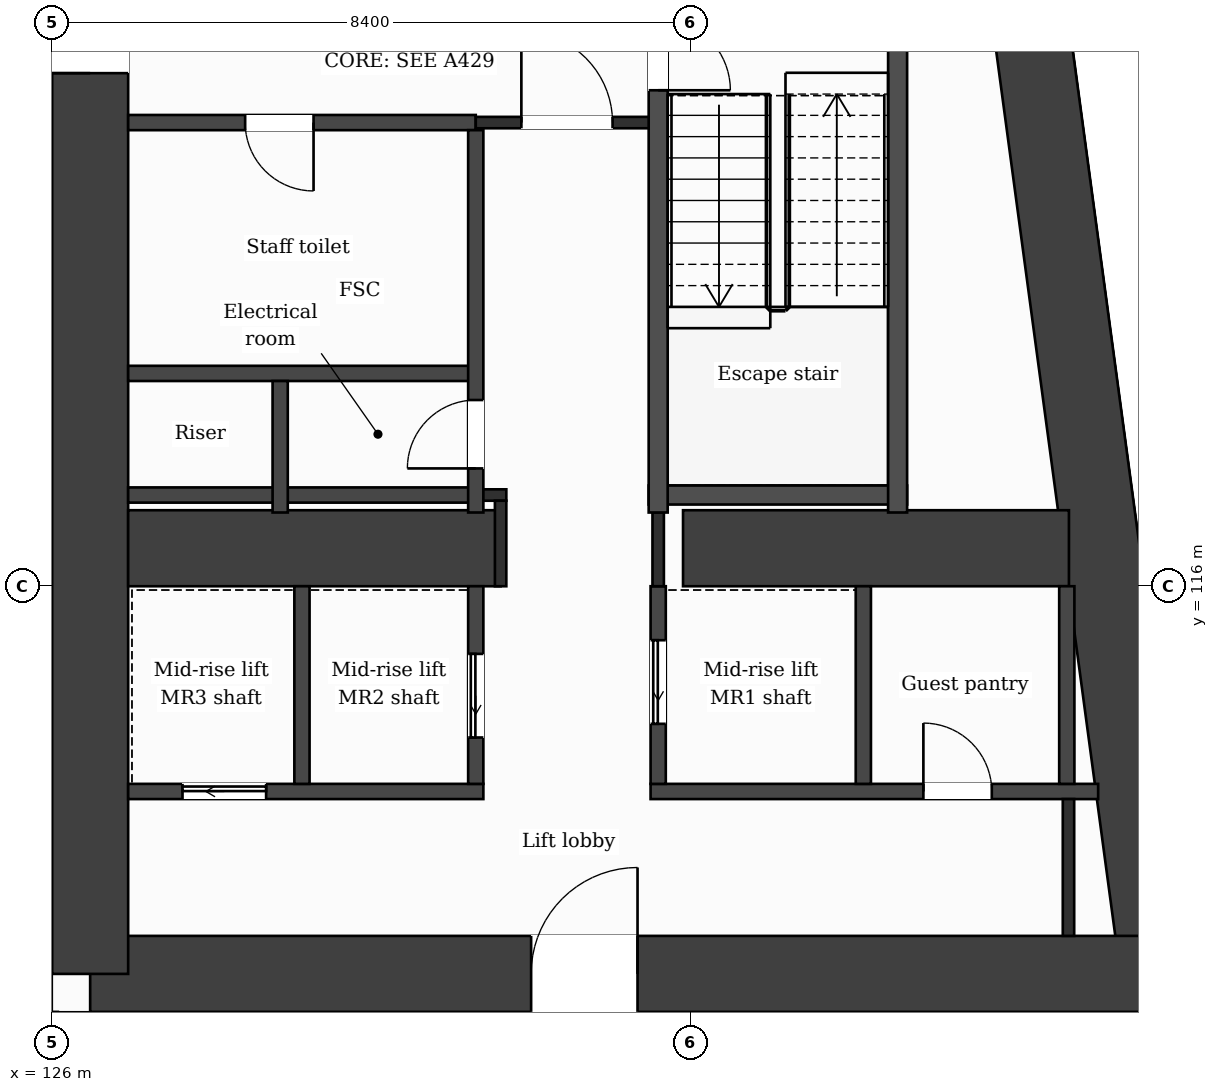
"""IFC4 building model, lengths in metres.
Left out: names, types, materials, properties, quantities, classifications, styles, units other than length and angle.
Written with IfcOpenShell. Run it as: python <this file> out.ifc"""

import sys

from ifc_helpers import new_model, si_unit, direction, frame, frame_2d, origin, place, context, subcontext, project, spatial, rectangle, extrude, element, fill, save


model = new_model("IFC4")
c1 = context("Model", 3, precision=1e-05, world=origin(), true_north=direction((0.0, 1.0)))
c2 = subcontext(c1, "Body", "Model", "MODEL_VIEW")
j1 = project(units=[si_unit("LENGTHUNIT", "METRE"), si_unit("PLANEANGLEUNIT", "RADIAN")], contexts=[c1])
p1 = place(None, origin())
s1 = spatial("IfcSite", under=j1, at=p1, CompositionType="ELEMENT")
p2 = place(p1, origin())
s2 = spatial("IfcBuilding", under=s1, at=p2, CompositionType="ELEMENT")
p3 = place(p2, frame((0.0, 0.0, 120.6)))
s3 = spatial("IfcBuildingStorey", under=s2, at=p3, CompositionType="ELEMENT", Elevation=120.6)
p4 = place(p3, frame((137.732, 131.9, 0.0), z_axis=(0.0, 0.0, 1.0), x_axis=(0.133411141623, -0.991060778808, 0.0)))
e1 = element("IfcWall", 1, at=p4, inside=s3, PredefinedType="SHEAR", context=c2, shape_type="SweptSolid", body=[
    extrude(rectangle(XDim=21.189, YDim=1.0, at=frame_2d((10.595, 0.0))), origin(), (0.0, 0.0, 1.0), 3.7),
])
p5 = place(p3, frame((140.559, 110.9, 0.0), z_axis=(0.0, 0.0, 1.0), x_axis=(-1.0, 0.0, 0.0)))
e2 = element("IfcWall", 2, at=p5, inside=s3, PredefinedType="SHEAR", context=c2, shape_type="SweptSolid", body=[
    extrude(rectangle(XDim=14.059, YDim=1.0, at=frame_2d((7.029, 0.0))), origin(), (0.0, 0.0, 1.0), 3.7),
])
p6 = place(p5, frame((6.858, 0.0, 0.0)))
e3 = element("IfcOpeningElement", 3, at=p6, cuts=e2, PredefinedType="OPENING", context=c2, shape_type="SweptSolid", body=[
    extrude(rectangle(XDim=1.4, YDim=2.1, at=frame_2d((0.7, 1.05))), frame((0.0, 0.51, 0.0), z_axis=(0.0, -1.0, 0.0), x_axis=(1.0, 0.0, 0.0)), (0.0, 0.0, 1.0), 1.02),
])
p7 = place(p3, frame((126.5, 110.9, 0.0), z_axis=(0.0, 0.0, 1.0), x_axis=(0.0, 1.0, 0.0)))
e4 = element("IfcWall", 4, at=p7, inside=s3, PredefinedType="SHEAR", context=c2, shape_type="SweptSolid", body=[
    extrude(rectangle(XDim=21.0, YDim=1.0, at=frame_2d((10.5, 0.0))), origin(), (0.0, 0.0, 1.0), 3.7),
])
p8 = place(p7, frame((11.85, 0.0, 0.0)))
e5 = element("IfcOpeningElement", 5, at=p8, cuts=e4, PredefinedType="OPENING", context=c2, shape_type="SweptSolid", body=[
    extrude(rectangle(XDim=1.4, YDim=2.1, at=frame_2d((0.7, 1.05))), frame((0.0, 0.51, 0.0), z_axis=(0.0, -1.0, 0.0), x_axis=(1.0, 0.0, 0.0)), (0.0, 0.0, 1.0), 1.02),
])
p9 = place(p3, frame((127.0, 116.5, 0.0), z_axis=(0.0, 0.0, 1.0), x_axis=(1.0, 0.0, 0.0)))
e6 = element("IfcWall", 6, at=p9, inside=s3, PredefinedType="SHEAR", context=c2, shape_type="SweptSolid", body=[
    extrude(rectangle(XDim=4.9, YDim=1.0, at=frame_2d((2.45, 0.0))), origin(), (0.0, 0.0, 1.0), 3.7),
])
p10 = place(p3, frame((134.3, 116.5, 0.0), z_axis=(0.0, 0.0, 1.0), x_axis=(1.0, 0.0, 0.0)))
e7 = element("IfcWall", 7, at=p10, inside=s3, PredefinedType="SHEAR", context=c2, shape_type="SweptSolid", body=[
    extrude(rectangle(XDim=5.077, YDim=1.0, at=frame_2d((2.539, 0.0))), origin(), (0.0, 0.0, 1.0), 3.7),
])
p11 = place(p3, frame((140.348, 103.85, 0.0), z_axis=(0.0, 0.0, 1.0), x_axis=(-0.133431549479, 0.991058031401, 0.0)))
e8 = element("IfcWall", 8, at=p11, inside=s3, PredefinedType="SOLIDWALL", context=c2, shape_type="SweptSolid", body=[
    extrude(rectangle(XDim=6.609, YDim=0.3, at=frame_2d((3.304, 0.0))), origin(), (0.0, 0.0, 1.0), 3.38),
])
p12 = place(p11, frame((0.737, 0.0, 0.9)))
e9 = element("IfcOpeningElement", 9, at=p12, cuts=e8, PredefinedType="OPENING", context=c2, shape_type="SweptSolid", body=[
    extrude(rectangle(XDim=1.2, YDim=2.1, at=frame_2d((0.6, 1.05))), frame((0.0, 0.16, 0.0), z_axis=(0.0, -1.0, 0.0), x_axis=(1.0, 0.0, 0.0)), (0.0, 0.0, 1.0), 0.32),
])
p13 = place(p11, frame((3.991, 0.0, 0.0)))
e10 = element("IfcOpeningElement", 10, at=p13, cuts=e8, PredefinedType="OPENING", context=c2, shape_type="SweptSolid", body=[
    extrude(rectangle(XDim=1.2, YDim=2.4, at=frame_2d((0.6, 1.2))), frame((0.0, 0.16, 0.0), z_axis=(0.0, -1.0, 0.0), x_axis=(1.0, 0.0, 0.0)), (0.0, 0.0, 1.0), 0.32),
])
p14 = place(p3, frame((127.0, 113.3, 0.0), z_axis=(0.0, 0.0, 1.0), x_axis=(1.0, 0.0, 0.0)))
e11 = element("IfcWall", 11, at=p14, inside=s3, PredefinedType="PARTITIONING", context=c2, shape_type="SweptSolid", body=[
    extrude(rectangle(XDim=4.673, YDim=0.2, at=frame_2d((2.336, 0.0))), origin(), (0.0, 0.0, 1.0), 3.38),
])
p15 = place(p14, frame((0.715, 0.0, 0.0)))
e12 = element("IfcOpeningElement", 12, at=p15, cuts=e11, PredefinedType="OPENING", context=c2, shape_type="SweptSolid", body=[
    extrude(rectangle(XDim=1.1, YDim=2.1, at=frame_2d((0.55, 1.05))), frame((0.0, 0.11, 0.0), z_axis=(0.0, -1.0, 0.0), x_axis=(1.0, 0.0, 0.0)), (0.0, 0.0, 1.0), 0.22),
])
p16 = place(p3, frame((133.873, 113.3, 0.0), z_axis=(0.0, 0.0, 1.0), x_axis=(1.0, 0.0, 0.0)))
e13 = element("IfcWall", 13, at=p16, inside=s3, PredefinedType="PARTITIONING", context=c2, shape_type="SweptSolid", body=[
    extrude(rectangle(XDim=5.888, YDim=0.2, at=frame_2d((2.944, 0.0))), origin(), (0.0, 0.0, 1.0), 3.38),
])
p17 = place(p16, frame((3.589, 0.0, 0.0)))
e14 = element("IfcOpeningElement", 14, at=p17, cuts=e13, PredefinedType="OPENING", context=c2, shape_type="SweptSolid", body=[
    extrude(rectangle(XDim=0.9, YDim=2.1, at=frame_2d((0.45, 1.05))), frame((0.0, 0.11, 0.0), z_axis=(0.0, -1.0, 0.0), x_axis=(1.0, 0.0, 0.0)), (0.0, 0.0, 1.0), 0.22),
])
p18 = place(p3, frame((127.0, 117.2, 0.0), z_axis=(0.0, 0.0, 1.0), x_axis=(1.0, 0.0, 0.0)))
e15 = element("IfcWall", 15, at=p18, inside=s3, PredefinedType="PARTITIONING", context=c2, shape_type="SweptSolid", body=[
    extrude(rectangle(XDim=4.573, YDim=0.2, at=frame_2d((2.287, 0.0))), origin(), (0.0, 0.0, 1.0), 3.38),
])
p19 = place(p3, frame((131.573, 117.2, 0.0), z_axis=(0.0, 0.0, 1.0), x_axis=(1.0, 0.0, 0.0)))
e16 = element("IfcWall", 16, at=p19, inside=s3, PredefinedType="PARTITIONING", context=c2, shape_type="SweptSolid", body=[
    extrude(rectangle(XDim=0.402, YDim=0.15, at=frame_2d((0.201, 0.0))), origin(), (0.0, 0.0, 1.0), 3.38),
])
p20 = place(p3, frame((133.848, 117.2, 0.0), z_axis=(0.0, 0.0, 1.0), x_axis=(1.0, 0.0, 0.0)))
e17 = element("IfcWall", 17, at=p20, inside=s3, PredefinedType="PARTITIONING", context=c2, shape_type="SweptSolid", body=[
    extrude(rectangle(XDim=3.4, YDim=0.25, at=frame_2d((1.7, 0.0))), origin(), (0.0, 0.0, 1.0), 3.38),
])
p21 = place(p3, frame((127.0, 118.8, 0.0), z_axis=(0.0, 0.0, 1.0), x_axis=(1.0, 0.0, 0.0)))
e18 = element("IfcWall", 18, at=p21, inside=s3, PredefinedType="PARTITIONING", context=c2, shape_type="SweptSolid", body=[
    extrude(rectangle(XDim=4.573, YDim=0.2, at=frame_2d((2.287, 0.0))), origin(), (0.0, 0.0, 1.0), 3.38),
])
p22 = place(p3, frame((127.0, 122.1, 0.0), z_axis=(0.0, 0.0, 1.0), x_axis=(1.0, 0.0, 0.0)))
e19 = element("IfcWall", 19, at=p22, inside=s3, PredefinedType="PARTITIONING", context=c2, shape_type="SweptSolid", body=[
    extrude(rectangle(XDim=4.573, YDim=0.2, at=frame_2d((2.287, 0.0))), origin(), (0.0, 0.0, 1.0), 3.38),
])
p23 = place(p22, frame((1.539, 0.0, 0.0)))
e20 = element("IfcOpeningElement", 20, at=p23, cuts=e19, PredefinedType="OPENING", context=c2, shape_type="SweptSolid", body=[
    extrude(rectangle(XDim=0.9, YDim=2.1, at=frame_2d((0.45, 1.05))), frame((0.0, 0.11, 0.0), z_axis=(0.0, -1.0, 0.0), x_axis=(1.0, 0.0, 0.0)), (0.0, 0.0, 1.0), 0.22),
])
p24 = place(p3, frame((131.573, 122.1, 0.0), z_axis=(0.0, 0.0, 1.0), x_axis=(1.0, 0.0, 0.0)))
e21 = element("IfcWall", 21, at=p24, inside=s3, PredefinedType="PARTITIONING", context=c2, shape_type="SweptSolid", body=[
    extrude(rectangle(XDim=2.4, YDim=0.15, at=frame_2d((1.2, 0.0))), origin(), (0.0, 0.0, 1.0), 3.38),
])
p25 = place(p24, frame((0.6, 0.0, 0.0)))
e22 = element("IfcOpeningElement", 22, at=p25, cuts=e21, PredefinedType="OPENING", context=c2, shape_type="SweptSolid", body=[
    extrude(rectangle(XDim=1.2, YDim=2.1, at=frame_2d((0.6, 1.05))), frame((0.0, 0.085, 0.0), z_axis=(0.0, -1.0, 0.0), x_axis=(1.0, 0.0, 0.0)), (0.0, 0.0, 1.0), 0.17),
])
p26 = place(p3, frame((100.8, 122.45, 0.0), z_axis=(0.0, 0.0, 1.0), x_axis=(1.0, 0.0, 0.0)))
e23 = element("IfcWall", 23, at=p26, inside=s3, PredefinedType="PARTITIONING", context=c2, shape_type="SweptSolid", body=[
    extrude(rectangle(XDim=25.2, YDim=0.15, at=frame_2d((12.6, 0.0))), origin(), (0.0, 0.0, 1.0), 3.38),
])
p27 = place(p3, frame((126.0, 109.075, 0.0), z_axis=(0.0, 0.0, 1.0), x_axis=(0.0, 1.0, 0.0)))
e24 = element("IfcWall", 24, at=p27, inside=s3, PredefinedType="PARTITIONING", context=c2, shape_type="SweptSolid", body=[
    extrude(rectangle(XDim=1.325, YDim=0.15, at=frame_2d((0.663, 0.0))), origin(), (0.0, 0.0, 1.0), 3.38),
])
p28 = place(p3, frame((129.0, 116.97, 0.0), z_axis=(0.0, 0.0, 1.0), x_axis=(0.0, 1.0, 0.0)))
e25 = element("IfcWall", 25, at=p28, inside=s3, PredefinedType="PARTITIONING", context=c2, shape_type="SweptSolid", body=[
    extrude(rectangle(XDim=1.73, YDim=0.2, at=frame_2d((0.865, 0.0))), origin(), (0.0, 0.0, 1.0), 3.38),
])
p29 = place(p3, frame((129.287, 113.4, 0.0), z_axis=(0.0, 0.0, 1.0), x_axis=(0.0, 1.0, 0.0)))
e26 = element("IfcWall", 26, at=p29, inside=s3, PredefinedType="PARTITIONING", context=c2, shape_type="SweptSolid", body=[
    extrude(rectangle(XDim=2.6, YDim=0.2, at=frame_2d((1.3, 0.0))), origin(), (0.0, 0.0, 1.0), 3.38),
])
p30 = place(p3, frame((131.573, 113.4, 0.0), z_axis=(0.0, 0.0, 1.0), x_axis=(0.0, 1.0, 0.0)))
e27 = element("IfcWall", 27, at=p30, inside=s3, PredefinedType="PARTITIONING", context=c2, shape_type="SweptSolid", body=[
    extrude(rectangle(XDim=2.6, YDim=0.2, at=frame_2d((1.3, 0.0))), origin(), (0.0, 0.0, 1.0), 3.38),
])
p31 = place(p30, frame((0.61, 0.0, 0.0)))
e28 = element("IfcOpeningElement", 28, at=p31, cuts=e27, PredefinedType="OPENING", context=c2, shape_type="SweptSolid", body=[
    extrude(rectangle(XDim=1.1, YDim=2.1, at=frame_2d((0.55, 1.05))), frame((0.0, 0.11, 0.0), z_axis=(0.0, -1.0, 0.0), x_axis=(1.0, 0.0, 0.0)), (0.0, 0.0, 1.0), 0.22),
])
p32 = place(p3, frame((131.573, 116.97, 0.0), z_axis=(0.0, 0.0, 1.0), x_axis=(0.0, 1.0, 0.0)))
e29 = element("IfcWall", 29, at=p32, inside=s3, PredefinedType="PARTITIONING", context=c2, shape_type="SweptSolid", body=[
    extrude(rectangle(XDim=5.03, YDim=0.2, at=frame_2d((2.515, 0.0))), origin(), (0.0, 0.0, 1.0), 3.38),
])
p33 = place(p32, frame((0.58, 0.0, 0.0)))
e30 = element("IfcOpeningElement", 30, at=p33, cuts=e29, PredefinedType="OPENING", context=c2, shape_type="SweptSolid", body=[
    extrude(rectangle(XDim=0.9, YDim=2.1, at=frame_2d((0.45, 1.05))), frame((0.0, 0.11, 0.0), z_axis=(0.0, -1.0, 0.0), x_axis=(1.0, 0.0, 0.0)), (0.0, 0.0, 1.0), 0.22),
])
p34 = place(p3, frame((131.9, 116.0, 0.0), z_axis=(0.0, 0.0, 1.0), x_axis=(0.0, 1.0, 0.0)))
e31 = element("IfcWall", 31, at=p34, inside=s3, PredefinedType="PARTITIONING", context=c2, shape_type="SweptSolid", body=[
    extrude(rectangle(XDim=1.125, YDim=0.15, at=frame_2d((0.562, 0.0))), origin(), (0.0, 0.0, 1.0), 3.38),
])
p35 = place(p3, frame((133.973, 113.4, 0.0), z_axis=(0.0, 0.0, 1.0), x_axis=(0.0, 1.0, 0.0)))
e32 = element("IfcWall", 32, at=p35, inside=s3, PredefinedType="PARTITIONING", context=c2, shape_type="SweptSolid", body=[
    extrude(rectangle(XDim=2.6, YDim=0.2, at=frame_2d((1.3, 0.0))), origin(), (0.0, 0.0, 1.0), 3.38),
])
p36 = place(p35, frame((0.79, 0.0, 0.0)))
e33 = element("IfcOpeningElement", 33, at=p36, cuts=e32, PredefinedType="OPENING", context=c2, shape_type="SweptSolid", body=[
    extrude(rectangle(XDim=1.1, YDim=2.1, at=frame_2d((0.55, 1.05))), frame((0.0, 0.11, 0.0), z_axis=(0.0, -1.0, 0.0), x_axis=(1.0, 0.0, 0.0)), (0.0, 0.0, 1.0), 0.22),
])
p37 = place(p3, frame((133.973, 116.0, 0.0), z_axis=(0.0, 0.0, 1.0), x_axis=(0.0, 1.0, 0.0)))
e34 = element("IfcWall", 34, at=p37, inside=s3, PredefinedType="PARTITIONING", context=c2, shape_type="SweptSolid", body=[
    extrude(rectangle(XDim=0.97, YDim=0.15, at=frame_2d((0.485, 0.0))), origin(), (0.0, 0.0, 1.0), 3.38),
])
p38 = place(p3, frame((133.973, 116.97, 0.0), z_axis=(0.0, 0.0, 1.0), x_axis=(0.0, 1.0, 0.0)))
e35 = element("IfcWall", 35, at=p38, inside=s3, PredefinedType="PARTITIONING", context=c2, shape_type="SweptSolid", body=[
    extrude(rectangle(XDim=6.855, YDim=0.25, at=frame_2d((3.427, 0.0))), origin(), (0.0, 0.0, 1.0), 3.38),
])
p39 = place(p38, frame((5.555, 0.0, 0.0)))
e36 = element("IfcOpeningElement", 36, at=p39, cuts=e35, PredefinedType="OPENING", context=c2, shape_type="SweptSolid", body=[
    extrude(rectangle(XDim=0.95, YDim=2.1, at=frame_2d((0.475, 1.05))), frame((0.0, 0.135, 0.0), z_axis=(0.0, -1.0, 0.0), x_axis=(1.0, 0.0, 0.0)), (0.0, 0.0, 1.0), 0.27),
])
p40 = place(p3, frame((136.672, 113.4, 0.0), z_axis=(0.0, 0.0, 1.0), x_axis=(0.0, 1.0, 0.0)))
e37 = element("IfcWall", 37, at=p40, inside=s3, PredefinedType="PARTITIONING", context=c2, shape_type="SweptSolid", body=[
    extrude(rectangle(XDim=2.6, YDim=0.2, at=frame_2d((1.3, 0.0))), origin(), (0.0, 0.0, 1.0), 3.38),
])
p41 = place(p3, frame((137.123, 116.97, 0.0), z_axis=(0.0, 0.0, 1.0), x_axis=(0.0, 1.0, 0.0)))
e38 = element("IfcWall", 38, at=p41, inside=s3, PredefinedType="PARTITIONING", context=c2, shape_type="SweptSolid", body=[
    extrude(rectangle(XDim=6.855, YDim=0.25, at=frame_2d((3.427, 0.0))), origin(), (0.0, 0.0, 1.0), 3.38),
])
p42 = place(p3, frame((139.349, 113.4, 0.0), z_axis=(0.0, 0.0, 1.0), x_axis=(0.0, 1.0, 0.0)))
e39 = element("IfcWall", 39, at=p42, inside=s3, PredefinedType="PARTITIONING", context=c2, shape_type="SweptSolid", body=[
    extrude(rectangle(XDim=2.6, YDim=0.2, at=frame_2d((1.3, 0.0))), origin(), (0.0, 0.0, 1.0), 3.38),
])
p43 = place(p3, frame((139.371, 111.4, 0.0), z_axis=(0.0, 0.0, 1.0), x_axis=(0.0, 1.0, 0.0)))
e40 = element("IfcWall", 40, at=p43, inside=s3, PredefinedType="PARTITIONING", context=c2, shape_type="SweptSolid", body=[
    extrude(rectangle(XDim=1.8, YDim=0.15, at=frame_2d((0.9, 0.0))), origin(), (0.0, 0.0, 1.0), 3.38),
])
p44 = place(p25, origin())
e41 = element("IfcDoor", 41, at=p44, inside=s3, OperationType="SINGLE_SWING_LEFT", PredefinedType="DOOR", context=c2, shape_type="SweptSolid", body=[
    extrude(rectangle(XDim=1.2, YDim=2.1, at=frame_2d((0.6, 1.05))), frame((0.0, 0.025, 0.0), z_axis=(0.0, -1.0, 0.0), x_axis=(1.0, 0.0, 0.0)), (0.0, 0.0, 1.0), 0.05),
])
fill(e22, e41)
p45 = place(p23, origin())
e42 = element("IfcDoor", 42, at=p45, inside=s3, OperationType="SINGLE_SWING_RIGHT", PredefinedType="DOOR", context=c2, shape_type="SweptSolid", body=[
    extrude(rectangle(XDim=0.9, YDim=2.1, at=frame_2d((0.45, 1.05))), frame((0.0, 0.025, 0.0), z_axis=(0.0, -1.0, 0.0), x_axis=(1.0, 0.0, 0.0)), (0.0, 0.0, 1.0), 0.05),
])
fill(e20, e42)
p46 = place(p39, origin())
e43 = element("IfcDoor", 43, at=p46, inside=s3, OperationType="SINGLE_SWING_LEFT", PredefinedType="DOOR", context=c2, shape_type="SweptSolid", body=[
    extrude(rectangle(XDim=0.95, YDim=2.1, at=frame_2d((0.475, 1.05))), frame((0.0, 0.025, 0.0), z_axis=(0.0, -1.0, 0.0), x_axis=(1.0, 0.0, 0.0)), (0.0, 0.0, 1.0), 0.05),
])
fill(e36, e43)
p47 = place(p33, origin())
e44 = element("IfcDoor", 44, at=p47, inside=s3, OperationType="SINGLE_SWING_LEFT", PredefinedType="DOOR", context=c2, shape_type="SweptSolid", body=[
    extrude(rectangle(XDim=0.9, YDim=2.1, at=frame_2d((0.45, 1.05))), frame((0.0, 0.025, 0.0), z_axis=(0.0, -1.0, 0.0), x_axis=(1.0, 0.0, 0.0)), (0.0, 0.0, 1.0), 0.05),
])
fill(e30, e44)
p48 = place(p36, origin())
e45 = element("IfcDoor", 45, at=p48, inside=s3, OperationType="SLIDING_TO_LEFT", PredefinedType="DOOR", context=c2, shape_type="SweptSolid", body=[
    extrude(rectangle(XDim=1.1, YDim=2.1, at=frame_2d((0.55, 1.05))), frame((0.0, 0.025, 0.0), z_axis=(0.0, -1.0, 0.0), x_axis=(1.0, 0.0, 0.0)), (0.0, 0.0, 1.0), 0.05),
])
fill(e33, e45)
p49 = place(p31, origin())
e46 = element("IfcDoor", 46, at=p49, inside=s3, OperationType="SLIDING_TO_LEFT", PredefinedType="DOOR", context=c2, shape_type="SweptSolid", body=[
    extrude(rectangle(XDim=1.1, YDim=2.1, at=frame_2d((0.55, 1.05))), frame((0.0, 0.025, 0.0), z_axis=(0.0, -1.0, 0.0), x_axis=(1.0, 0.0, 0.0)), (0.0, 0.0, 1.0), 0.05),
])
fill(e28, e46)
p50 = place(p15, origin())
e47 = element("IfcDoor", 47, at=p50, inside=s3, OperationType="SLIDING_TO_LEFT", PredefinedType="DOOR", context=c2, shape_type="SweptSolid", body=[
    extrude(rectangle(XDim=1.1, YDim=2.1, at=frame_2d((0.55, 1.05))), frame((0.0, 0.025, 0.0), z_axis=(0.0, -1.0, 0.0), x_axis=(1.0, 0.0, 0.0)), (0.0, 0.0, 1.0), 0.05),
])
fill(e12, e47)
p51 = place(p17, origin())
e48 = element("IfcDoor", 48, at=p51, inside=s3, OperationType="SINGLE_SWING_LEFT", PredefinedType="DOOR", context=c2, shape_type="SweptSolid", body=[
    extrude(rectangle(XDim=0.9, YDim=2.1, at=frame_2d((0.45, 1.05))), frame((0.0, 0.025, 0.0), z_axis=(0.0, -1.0, 0.0), x_axis=(1.0, 0.0, 0.0)), (0.0, 0.0, 1.0), 0.05),
])
fill(e14, e48)
p52 = place(p6, origin())
e49 = element("IfcDoor", 49, at=p52, inside=s3, OperationType="SINGLE_SWING_LEFT", PredefinedType="DOOR", context=c2, shape_type="SweptSolid", body=[
    extrude(rectangle(XDim=1.4, YDim=2.1, at=frame_2d((0.7, 1.05))), frame((0.0, 0.025, 0.0), z_axis=(0.0, -1.0, 0.0), x_axis=(1.0, 0.0, 0.0)), (0.0, 0.0, 1.0), 0.05),
])
fill(e3, e49)
p53 = place(p8, origin())
e50 = element("IfcDoor", 50, at=p53, inside=s3, OperationType="SINGLE_SWING_LEFT", PredefinedType="DOOR", context=c2, shape_type="SweptSolid", body=[
    extrude(rectangle(XDim=1.4, YDim=2.1, at=frame_2d((0.7, 1.05))), frame((0.0, 0.025, 0.0), z_axis=(0.0, -1.0, 0.0), x_axis=(1.0, 0.0, 0.0)), (0.0, 0.0, 1.0), 0.05),
])
fill(e5, e50)
save(model, sys.argv[1])
